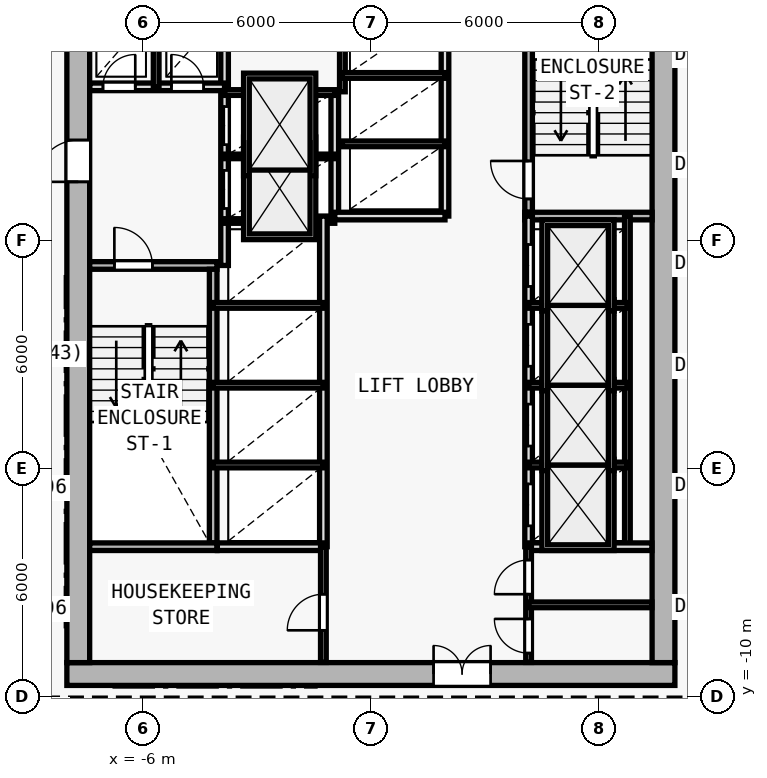
"""IFC4 building model, lengths in metres.
Left out: names, types, materials, properties, quantities, classifications, styles, units other than length and angle.
Written with IfcOpenShell. Run it as: python <this file> out.ifc"""

import sys

from ifc_helpers import new_model, si_unit, direction, frame, frame_2d, origin, origin_2d, place, context, subcontext, project, spatial, rectangle, i_section, extrude, element, fill, save


model = new_model("IFC4")
c1 = context("Model", 3, precision=1e-05, world=origin(), true_north=direction((0.0, 1.0)))
c2 = subcontext(c1, "Body", "Model", "MODEL_VIEW")
j1 = project(units=[si_unit("LENGTHUNIT", "METRE"), si_unit("PLANEANGLEUNIT", "RADIAN")], contexts=[c1])
p1 = place(None, origin())
s1 = spatial("IfcSite", under=j1, at=p1, CompositionType="ELEMENT")
p2 = place(p1, origin())
s2 = spatial("IfcBuilding", under=s1, at=p2, CompositionType="ELEMENT")
p3 = place(p2, frame((0.0, 0.0, 51.6)))
s3 = spatial("IfcBuildingStorey", under=s2, at=p3, CompositionType="ELEMENT", Elevation=51.6)
for number, where, z_axis, x_axis in (
    (1, (-7.7, -9.4, 0.0), (0.0, 0.0, 1.0), (1.0, 0.0, 0.0)),
    (2, (7.7, -9.4, 0.0), (0.0, 0.0, 1.0), (1.0, 0.0, 0.0)),
    (3, (0.0, -9.4, 0.0), (0.0, 0.0, 1.0), (1.0, 0.0, 0.0)),
    (4, (7.7, 0.4, 0.0), (0.0, 0.0, 1.0), (1.0, 0.0, 0.0)),
    (5, (-7.7, 2.0, 0.0), (0.0, 0.0, 1.0), (1.0, 0.0, 0.0)),
):
    element("IfcColumn", number, at=place(p3, frame(where, z_axis=z_axis, x_axis=x_axis)), inside=s3, PredefinedType="COLUMN", context=c2, shape_type="SweptSolid", body=[
        extrude(i_section(OverallWidth=0.416, OverallDepth=0.446, WebThickness=0.025, FlangeThickness=0.04, FilletRadius=0.015, at=origin_2d()), origin(), (0.0, 0.0, 1.0), 3.6),
    ])
p4 = place(p3, frame((-8.0, -9.4, 0.0), z_axis=(0.0, 0.0, 1.0), x_axis=(1.0, 0.0, 0.0)))
e6 = element("IfcWall", 6, at=p4, inside=s3, PredefinedType="SHEAR", context=c2, shape_type="SweptSolid", body=[
    extrude(rectangle(XDim=16.0, YDim=0.6, at=frame_2d((8.0, 0.0))), origin(), (0.0, 0.0, 1.0), 3.35),
])
p5 = place(p4, frame((9.65, 0.0, 0.0)))
e7 = element("IfcOpeningElement", 7, at=p5, cuts=e6, PredefinedType="OPENING", context=c2, shape_type="SweptSolid", body=[
    extrude(rectangle(XDim=1.5, YDim=2.2, at=frame_2d((0.75, 1.1))), frame((0.0, 0.31, 0.0), z_axis=(0.0, -1.0, 0.0), x_axis=(1.0, 0.0, 0.0)), (0.0, 0.0, 1.0), 0.62),
])
p6 = place(p3, frame((-7.7, -9.1, 0.0), z_axis=(0.0, 0.0, 1.0), x_axis=(0.0, 1.0, 0.0)))
e8 = element("IfcWall", 8, at=p6, inside=s3, PredefinedType="SHEAR", context=c2, shape_type="SweptSolid", body=[
    extrude(rectangle(XDim=19.0, YDim=0.6, at=frame_2d((9.5, 0.0))), origin(), (0.0, 0.0, 1.0), 3.35),
])
p7 = place(p6, frame((12.65, 0.0, 0.0)))
e9 = element("IfcOpeningElement", 9, at=p7, cuts=e8, PredefinedType="OPENING", context=c2, shape_type="SweptSolid", body=[
    extrude(rectangle(XDim=1.1, YDim=2.15, at=frame_2d((0.55, 1.075))), frame((0.0, 0.31, 0.0), z_axis=(0.0, -1.0, 0.0), x_axis=(1.0, 0.0, 0.0)), (0.0, 0.0, 1.0), 0.62),
])
p8 = place(p3, frame((7.7, 9.9, 0.0), z_axis=(0.0, 0.0, 1.0), x_axis=(0.0, -1.0, 0.0)))
e10 = element("IfcWall", 10, at=p8, inside=s3, PredefinedType="SHEAR", context=c2, shape_type="SweptSolid", body=[
    extrude(rectangle(XDim=19.0, YDim=0.6, at=frame_2d((9.5, 0.0))), origin(), (0.0, 0.0, 1.0), 3.35),
])
p9 = place(p3, frame((-7.4, 1.35, 0.0), z_axis=(0.0, 0.0, 1.0), x_axis=(1.0, 0.0, 0.0)))
e11 = element("IfcWall", 11, at=p9, inside=s3, PredefinedType="SOLIDWALL", context=c2, shape_type="SweptSolid", body=[
    extrude(rectangle(XDim=3.35, YDim=0.2, at=frame_2d((1.675, 0.0))), origin(), (0.0, 0.0, 1.0), 3.35),
])
p10 = place(p9, frame((0.65, 0.0, 0.0)))
e12 = element("IfcOpeningElement", 12, at=p10, cuts=e11, PredefinedType="OPENING", context=c2, shape_type="SweptSolid", body=[
    extrude(rectangle(XDim=1.0, YDim=2.15, at=frame_2d((0.5, 1.075))), frame((0.0, 0.11, 0.0), z_axis=(0.0, -1.0, 0.0), x_axis=(1.0, 0.0, 0.0)), (0.0, 0.0, 1.0), 0.22),
])
p11 = place(p3, frame((-4.15, -5.95, 0.0), z_axis=(0.0, 0.0, 1.0), x_axis=(0.0, 1.0, 0.0)))
e13 = element("IfcWall", 13, at=p11, inside=s3, PredefinedType="SOLIDWALL", context=c2, shape_type="SweptSolid", body=[
    extrude(rectangle(XDim=7.2, YDim=0.2, at=frame_2d((3.6, 0.0))), origin(), (0.0, 0.0, 1.0), 3.35),
])
p12 = place(p3, frame((-3.85, 1.35, 0.0), z_axis=(0.0, 0.0, 1.0), x_axis=(0.0, 1.0, 0.0)))
e14 = element("IfcWall", 14, at=p12, inside=s3, PredefinedType="SOLIDWALL", context=c2, shape_type="SweptSolid", body=[
    extrude(rectangle(XDim=8.545, YDim=0.2, at=frame_2d((4.272, 0.0))), origin(), (0.0, 0.0, 1.0), 3.35),
])
p13 = place(p12, frame((1.5, 0.0, 0.0)))
e15 = element("IfcOpeningElement", 15, at=p13, cuts=e14, PredefinedType="OPENING", context=c2, shape_type="SweptSolid", body=[
    extrude(rectangle(XDim=1.0, YDim=2.15, at=frame_2d((0.5, 1.075))), frame((0.0, 0.11, 0.0), z_axis=(0.0, -1.0, 0.0), x_axis=(1.0, 0.0, 0.0)), (0.0, 0.0, 1.0), 0.22),
])
p14 = place(p12, frame((3.18, 0.0, 0.0)))
e16 = element("IfcOpeningElement", 16, at=p14, cuts=e14, PredefinedType="OPENING", context=c2, shape_type="SweptSolid", body=[
    extrude(rectangle(XDim=1.0, YDim=2.15, at=frame_2d((0.5, 1.075))), frame((0.0, 0.11, 0.0), z_axis=(0.0, -1.0, 0.0), x_axis=(1.0, 0.0, 0.0)), (0.0, 0.0, 1.0), 0.22),
])
p15 = place(p3, frame((-7.395, 6.05, 0.0), z_axis=(0.0, 0.0, 1.0), x_axis=(1.0, 0.0, 0.0)))
e17 = element("IfcWall", 17, at=p15, inside=s3, PredefinedType="SOLIDWALL", context=c2, shape_type="SweptSolid", body=[
    extrude(rectangle(XDim=3.545, YDim=0.2, at=frame_2d((1.772, 0.0))), origin(), (0.0, 0.0, 1.0), 3.35),
])
p16 = place(p15, frame((0.345, 0.0, 0.0)))
e18 = element("IfcOpeningElement", 18, at=p16, cuts=e17, PredefinedType="OPENING", context=c2, shape_type="SweptSolid", body=[
    extrude(rectangle(XDim=0.85, YDim=2.1, at=frame_2d((0.425, 1.05))), frame((0.0, 0.11, 0.0), z_axis=(0.0, -1.0, 0.0), x_axis=(1.0, 0.0, 0.0)), (0.0, 0.0, 1.0), 0.22),
])
p17 = place(p15, frame((2.145, 0.0, 0.0)))
e19 = element("IfcOpeningElement", 19, at=p17, cuts=e17, PredefinedType="OPENING", context=c2, shape_type="SweptSolid", body=[
    extrude(rectangle(XDim=0.85, YDim=2.1, at=frame_2d((0.425, 1.05))), frame((0.0, 0.11, 0.0), z_axis=(0.0, -1.0, 0.0), x_axis=(1.0, 0.0, 0.0)), (0.0, 0.0, 1.0), 0.22),
])
p18 = place(p3, frame((-5.65, 6.05, 0.0), z_axis=(0.0, 0.0, 1.0), x_axis=(0.0, 1.0, 0.0)))
e20 = element("IfcWall", 20, at=p18, inside=s3, PredefinedType="PARTITIONING", context=c2, shape_type="SweptSolid", body=[
    extrude(rectangle(XDim=2.05, YDim=0.15, at=frame_2d((1.025, 0.0))), origin(), (0.0, 0.0, 1.0), 3.35),
])
p19 = place(p3, frame((4.15, 2.75, 0.0), z_axis=(0.0, 0.0, 1.0), x_axis=(0.0, 1.0, 0.0)))
e21 = element("IfcWall", 21, at=p19, inside=s3, PredefinedType="SOLIDWALL", context=c2, shape_type="SweptSolid", body=[
    extrude(rectangle(XDim=7.15, YDim=0.2, at=frame_2d((3.575, 0.0))), origin(), (0.0, 0.0, 1.0), 3.35),
])
p20 = place(p19, frame((0.35, 0.0, 0.0)))
e22 = element("IfcOpeningElement", 22, at=p20, cuts=e21, PredefinedType="OPENING", context=c2, shape_type="SweptSolid", body=[
    extrude(rectangle(XDim=1.0, YDim=2.15, at=frame_2d((0.5, 1.075))), frame((0.0, 0.11, 0.0), z_axis=(0.0, -1.0, 0.0), x_axis=(1.0, 0.0, 0.0)), (0.0, 0.0, 1.0), 0.22),
])
p21 = place(p3, frame((4.05, 2.65, 0.0), z_axis=(0.0, 0.0, 1.0), x_axis=(1.0, 0.0, 0.0)))
e23 = element("IfcWall", 23, at=p21, inside=s3, PredefinedType="SOLIDWALL", context=c2, shape_type="SweptSolid", body=[
    extrude(rectangle(XDim=3.35, YDim=0.2, at=frame_2d((1.675, 0.0))), origin(), (0.0, 0.0, 1.0), 3.35),
])
p22 = place(p3, frame((-0.95, 2.65, 0.0), z_axis=(0.0, 0.0, 1.0), x_axis=(0.0, 1.0, 0.0)))
e24 = element("IfcWall", 24, at=p22, inside=s3, PredefinedType="SOLIDWALL", context=c2, shape_type="SweptSolid", body=[
    extrude(rectangle(XDim=3.27, YDim=0.2, at=frame_2d((1.635, 0.0))), origin(), (0.0, 0.0, 1.0), 3.35),
])
for number, where, z_axis, x_axis in (
    (25, (-3.85, 2.52, 0.0), (0.0, 0.0, 1.0), (1.0, 0.0, 0.0)),
    (26, (-3.85, 4.22, 0.0), (0.0, 0.0, 1.0), (1.0, 0.0, 0.0)),
):
    element("IfcWall", number, at=place(p3, frame(where, z_axis=z_axis, x_axis=x_axis)), inside=s3, PredefinedType="PARTITIONING", context=c2, shape_type="SweptSolid", body=[
        extrude(rectangle(XDim=2.9, YDim=0.12, at=frame_2d((1.45, 0.0))), origin(), (0.0, 0.0, 1.0), 3.35),
    ])
p23 = place(p3, frame((-3.85, 5.9, 0.0), z_axis=(0.0, 0.0, 1.0), x_axis=(1.0, 0.0, 0.0)))
e27 = element("IfcWall", 27, at=p23, inside=s3, PredefinedType="PARTITIONING", context=c2, shape_type="SweptSolid", body=[
    extrude(rectangle(XDim=2.9, YDim=0.15, at=frame_2d((1.45, 0.0))), origin(), (0.0, 0.0, 1.0), 3.35),
])
p24 = place(p3, frame((4.15, -6.05, 0.0), z_axis=(0.0, 0.0, 1.0), x_axis=(0.0, 1.0, 0.0)))
e28 = element("IfcWall", 28, at=p24, inside=s3, PredefinedType="SOLIDWALL", context=c2, shape_type="SweptSolid", body=[
    extrude(rectangle(XDim=8.7, YDim=0.2, at=frame_2d((4.35, 0.0))), origin(), (0.0, 0.0, 1.0), 3.35),
])
p25 = place(p24, frame((0.55, 0.0, 0.0)))
e29 = element("IfcOpeningElement", 29, at=p25, cuts=e28, PredefinedType="OPENING", context=c2, shape_type="SweptSolid", body=[
    extrude(rectangle(XDim=1.1, YDim=2.15, at=frame_2d((0.55, 1.075))), frame((0.0, 0.11, 0.0), z_axis=(0.0, -1.0, 0.0), x_axis=(1.0, 0.0, 0.0)), (0.0, 0.0, 1.0), 0.22),
])
p26 = place(p24, frame((2.65, 0.0, 0.0)))
e30 = element("IfcOpeningElement", 30, at=p26, cuts=e28, PredefinedType="OPENING", context=c2, shape_type="SweptSolid", body=[
    extrude(rectangle(XDim=1.1, YDim=2.15, at=frame_2d((0.55, 1.075))), frame((0.0, 0.11, 0.0), z_axis=(0.0, -1.0, 0.0), x_axis=(1.0, 0.0, 0.0)), (0.0, 0.0, 1.0), 0.22),
])
p27 = place(p24, frame((4.75, 0.0, 0.0)))
e31 = element("IfcOpeningElement", 31, at=p27, cuts=e28, PredefinedType="OPENING", context=c2, shape_type="SweptSolid", body=[
    extrude(rectangle(XDim=1.1, YDim=2.15, at=frame_2d((0.55, 1.075))), frame((0.0, 0.11, 0.0), z_axis=(0.0, -1.0, 0.0), x_axis=(1.0, 0.0, 0.0)), (0.0, 0.0, 1.0), 0.22),
])
p28 = place(p24, frame((6.85, 0.0, 0.0)))
e32 = element("IfcOpeningElement", 32, at=p28, cuts=e28, PredefinedType="OPENING", context=c2, shape_type="SweptSolid", body=[
    extrude(rectangle(XDim=1.1, YDim=2.15, at=frame_2d((0.55, 1.075))), frame((0.0, 0.11, 0.0), z_axis=(0.0, -1.0, 0.0), x_axis=(1.0, 0.0, 0.0)), (0.0, 0.0, 1.0), 0.22),
])
p29 = place(p3, frame((6.75, -6.05, 0.0), z_axis=(0.0, 0.0, 1.0), x_axis=(0.0, 1.0, 0.0)))
e33 = element("IfcWall", 33, at=p29, inside=s3, PredefinedType="PARTITIONING", context=c2, shape_type="SweptSolid", body=[
    extrude(rectangle(XDim=8.7, YDim=0.15, at=frame_2d((4.35, 0.0))), origin(), (0.0, 0.0, 1.0), 3.35),
])
for number, where, z_axis, x_axis in (
    (34, (4.15, -3.9, 0.0), (0.0, 0.0, 1.0), (1.0, 0.0, 0.0)),
    (35, (4.15, -1.8, 0.0), (0.0, 0.0, 1.0), (1.0, 0.0, 0.0)),
    (36, (4.15, 0.3, 0.0), (0.0, 0.0, 1.0), (1.0, 0.0, 0.0)),
):
    element("IfcWall", number, at=place(p3, frame(where, z_axis=z_axis, x_axis=x_axis)), inside=s3, PredefinedType="PARTITIONING", context=c2, shape_type="SweptSolid", body=[
        extrude(rectangle(XDim=2.6, YDim=0.15, at=frame_2d((1.3, 0.0))), origin(), (0.0, 0.0, 1.0), 3.35),
    ])
p30 = place(p3, frame((-1.25, -6.05, 0.0), z_axis=(0.0, 0.0, 1.0), x_axis=(0.0, 1.0, 0.0)))
e37 = element("IfcWall", 37, at=p30, inside=s3, PredefinedType="SOLIDWALL", context=c2, shape_type="SweptSolid", body=[
    extrude(rectangle(XDim=8.7, YDim=0.2, at=frame_2d((4.35, 0.0))), origin(), (0.0, 0.0, 1.0), 3.35),
])
for number, where, z_axis, x_axis in (
    (38, (-4.15, -3.9, 0.0), (0.0, 0.0, 1.0), (1.0, 0.0, 0.0)),
    (39, (-4.15, -1.8, 0.0), (0.0, 0.0, 1.0), (1.0, 0.0, 0.0)),
    (40, (-4.15, 0.3, 0.0), (0.0, 0.0, 1.0), (1.0, 0.0, 0.0)),
):
    element("IfcWall", number, at=place(p3, frame(where, z_axis=z_axis, x_axis=x_axis)), inside=s3, PredefinedType="PARTITIONING", context=c2, shape_type="SweptSolid", body=[
        extrude(rectangle(XDim=2.9, YDim=0.15, at=frame_2d((1.45, 0.0))), origin(), (0.0, 0.0, 1.0), 3.35),
    ])
p31 = place(p3, frame((1.95, 2.65, 0.0), z_axis=(0.0, 0.0, 1.0), x_axis=(0.0, 1.0, 0.0)))
e41 = element("IfcWall", 41, at=p31, inside=s3, PredefinedType="SOLIDWALL", context=c2, shape_type="SweptSolid", body=[
    extrude(rectangle(XDim=7.245, YDim=0.2, at=frame_2d((3.623, 0.0))), origin(), (0.0, 0.0, 1.0), 3.35),
])
p32 = place(p3, frame((-0.95, 2.65, 0.0), z_axis=(0.0, 0.0, 1.0), x_axis=(1.0, 0.0, 0.0)))
e42 = element("IfcWall", 42, at=p32, inside=s3, PredefinedType="SOLIDWALL", context=c2, shape_type="SweptSolid", body=[
    extrude(rectangle(XDim=2.9, YDim=0.2, at=frame_2d((1.45, 0.0))), origin(), (0.0, 0.0, 1.0), 3.35),
])
p33 = place(p3, frame((-0.75, 5.92, 0.0), z_axis=(0.0, 0.0, 1.0), x_axis=(0.0, 1.0, 0.0)))
e43 = element("IfcWall", 43, at=p33, inside=s3, PredefinedType="PARTITIONING", context=c2, shape_type="SweptSolid", body=[
    extrude(rectangle(XDim=3.975, YDim=0.15, at=frame_2d((1.988, 0.0))), origin(), (0.0, 0.0, 1.0), 3.35),
])
for number, where, z_axis, x_axis in (
    (44, (-0.75, 4.55, 0.0), (0.0, 0.0, 1.0), (1.0, 0.0, 0.0)),
    (45, (-0.75, 6.35, 0.0), (0.0, 0.0, 1.0), (1.0, 0.0, 0.0)),
):
    element("IfcWall", number, at=place(p3, frame(where, z_axis=z_axis, x_axis=x_axis)), inside=s3, PredefinedType="PARTITIONING", context=c2, shape_type="SweptSolid", body=[
        extrude(rectangle(XDim=2.7, YDim=0.15, at=frame_2d((1.35, 0.0))), origin(), (0.0, 0.0, 1.0), 3.35),
    ])
p34 = place(p3, frame((-7.4, -6.05, 0.0), z_axis=(0.0, 0.0, 1.0), x_axis=(1.0, 0.0, 0.0)))
e46 = element("IfcWall", 46, at=p34, inside=s3, PredefinedType="SOLIDWALL", context=c2, shape_type="SweptSolid", body=[
    extrude(rectangle(XDim=3.35, YDim=0.2, at=frame_2d((1.675, 0.0))), origin(), (0.0, 0.0, 1.0), 3.35),
])
p35 = place(p3, frame((-4.04, -6.05, 0.0), z_axis=(0.0, 0.0, 1.0), x_axis=(1.0, 0.0, 0.0)))
e47 = element("IfcWall", 47, at=p35, inside=s3, PredefinedType="SOLIDWALL", context=c2, shape_type="SweptSolid", body=[
    extrude(rectangle(XDim=2.79, YDim=0.2, at=frame_2d((1.395, 0.0))), origin(), (0.0, 0.0, 1.0), 3.35),
])
p36 = place(p3, frame((4.15, -6.05, 0.0), z_axis=(0.0, 0.0, 1.0), x_axis=(1.0, 0.0, 0.0)))
e48 = element("IfcWall", 48, at=p36, inside=s3, PredefinedType="SOLIDWALL", context=c2, shape_type="SweptSolid", body=[
    extrude(rectangle(XDim=3.245, YDim=0.2, at=frame_2d((1.623, 0.0))), origin(), (0.0, 0.0, 1.0), 3.35),
])
p37 = place(p3, frame((-1.25, -9.095, 0.0), z_axis=(0.0, 0.0, 1.0), x_axis=(0.0, 1.0, 0.0)))
e49 = element("IfcWall", 49, at=p37, inside=s3, PredefinedType="PARTITIONING", context=c2, shape_type="SweptSolid", body=[
    extrude(rectangle(XDim=3.045, YDim=0.15, at=frame_2d((1.522, 0.0))), origin(), (0.0, 0.0, 1.0), 3.35),
])
p38 = place(p37, frame((0.845, 0.0, 0.0)))
e50 = element("IfcOpeningElement", 50, at=p38, cuts=e49, PredefinedType="OPENING", context=c2, shape_type="SweptSolid", body=[
    extrude(rectangle(XDim=0.95, YDim=2.1, at=frame_2d((0.475, 1.05))), frame((0.0, 0.085, 0.0), z_axis=(0.0, -1.0, 0.0), x_axis=(1.0, 0.0, 0.0)), (0.0, 0.0, 1.0), 0.17),
])
p39 = place(p3, frame((4.15, -9.095, 0.0), z_axis=(0.0, 0.0, 1.0), x_axis=(0.0, 1.0, 0.0)))
e51 = element("IfcWall", 51, at=p39, inside=s3, PredefinedType="PARTITIONING", context=c2, shape_type="SweptSolid", body=[
    extrude(rectangle(XDim=3.045, YDim=0.15, at=frame_2d((1.522, 0.0))), origin(), (0.0, 0.0, 1.0), 3.35),
])
p40 = place(p39, frame((0.245, 0.0, 0.0)))
e52 = element("IfcOpeningElement", 52, at=p40, cuts=e51, PredefinedType="OPENING", context=c2, shape_type="SweptSolid", body=[
    extrude(rectangle(XDim=0.9, YDim=2.1, at=frame_2d((0.45, 1.05))), frame((0.0, 0.085, 0.0), z_axis=(0.0, -1.0, 0.0), x_axis=(1.0, 0.0, 0.0)), (0.0, 0.0, 1.0), 0.17),
])
p41 = place(p39, frame((1.795, 0.0, 0.0)))
e53 = element("IfcOpeningElement", 53, at=p41, cuts=e51, PredefinedType="OPENING", context=c2, shape_type="SweptSolid", body=[
    extrude(rectangle(XDim=0.9, YDim=2.1, at=frame_2d((0.45, 1.05))), frame((0.0, 0.085, 0.0), z_axis=(0.0, -1.0, 0.0), x_axis=(1.0, 0.0, 0.0)), (0.0, 0.0, 1.0), 0.17),
])
p42 = place(p3, frame((4.15, -7.58, 0.0), z_axis=(0.0, 0.0, 1.0), x_axis=(1.0, 0.0, 0.0)))
e54 = element("IfcWall", 54, at=p42, inside=s3, PredefinedType="PARTITIONING", context=c2, shape_type="SweptSolid", body=[
    extrude(rectangle(XDim=3.245, YDim=0.15, at=frame_2d((1.623, 0.0))), origin(), (0.0, 0.0, 1.0), 3.35),
])
p43 = place(p5, origin())
e55 = element("IfcDoor", 55, at=p43, inside=s3, OperationType="DOUBLE_DOOR_SINGLE_SWING", PredefinedType="DOOR", context=c2, shape_type="SweptSolid", body=[
    extrude(rectangle(XDim=1.5, YDim=2.2, at=frame_2d((0.75, 1.1))), frame((0.0, 0.025, 0.0), z_axis=(0.0, -1.0, 0.0), x_axis=(1.0, 0.0, 0.0)), (0.0, 0.0, 1.0), 0.05),
])
fill(e7, e55)
p44 = place(p7, origin())
e56 = element("IfcDoor", 56, at=p44, inside=s3, OperationType="SINGLE_SWING_LEFT", PredefinedType="DOOR", context=c2, shape_type="SweptSolid", body=[
    extrude(rectangle(XDim=1.1, YDim=2.15, at=frame_2d((0.55, 1.075))), frame((0.0, 0.025, 0.0), z_axis=(0.0, -1.0, 0.0), x_axis=(1.0, 0.0, 0.0)), (0.0, 0.0, 1.0), 0.05),
])
fill(e9, e56)
p45 = place(p10, origin())
e57 = element("IfcDoor", 57, at=p45, inside=s3, OperationType="SINGLE_SWING_LEFT", PredefinedType="DOOR", context=c2, shape_type="SweptSolid", body=[
    extrude(rectangle(XDim=1.0, YDim=2.15, at=frame_2d((0.5, 1.075))), frame((0.0, 0.025, 0.0), z_axis=(0.0, -1.0, 0.0), x_axis=(1.0, 0.0, 0.0)), (0.0, 0.0, 1.0), 0.05),
])
fill(e12, e57)
p46 = place(p16, origin())
e58 = element("IfcDoor", 58, at=p46, inside=s3, OperationType="SINGLE_SWING_RIGHT", PredefinedType="DOOR", context=c2, shape_type="SweptSolid", body=[
    extrude(rectangle(XDim=0.85, YDim=2.1, at=frame_2d((0.425, 1.05))), frame((0.0, 0.025, 0.0), z_axis=(0.0, -1.0, 0.0), x_axis=(1.0, 0.0, 0.0)), (0.0, 0.0, 1.0), 0.05),
])
fill(e18, e58)
p47 = place(p17, origin())
e59 = element("IfcDoor", 59, at=p47, inside=s3, OperationType="SINGLE_SWING_LEFT", PredefinedType="DOOR", context=c2, shape_type="SweptSolid", body=[
    extrude(rectangle(XDim=0.85, YDim=2.1, at=frame_2d((0.425, 1.05))), frame((0.0, 0.025, 0.0), z_axis=(0.0, -1.0, 0.0), x_axis=(1.0, 0.0, 0.0)), (0.0, 0.0, 1.0), 0.05),
])
fill(e19, e59)
p48 = place(p20, origin())
e60 = element("IfcDoor", 60, at=p48, inside=s3, OperationType="SINGLE_SWING_RIGHT", PredefinedType="DOOR", context=c2, shape_type="SweptSolid", body=[
    extrude(rectangle(XDim=1.0, YDim=2.15, at=frame_2d((0.5, 1.075))), frame((0.0, 0.025, 0.0), z_axis=(0.0, -1.0, 0.0), x_axis=(1.0, 0.0, 0.0)), (0.0, 0.0, 1.0), 0.05),
])
fill(e22, e60)
p49 = place(p25, origin())
e61 = element("IfcDoor", 61, at=p49, inside=s3, OperationType="DOUBLE_DOOR_SLIDING", PredefinedType="DOOR", context=c2, shape_type="SweptSolid", body=[
    extrude(rectangle(XDim=1.1, YDim=2.15, at=frame_2d((0.55, 1.075))), frame((0.0, 0.025, 0.0), z_axis=(0.0, -1.0, 0.0), x_axis=(1.0, 0.0, 0.0)), (0.0, 0.0, 1.0), 0.05),
])
fill(e29, e61)
p50 = place(p26, origin())
e62 = element("IfcDoor", 62, at=p50, inside=s3, OperationType="DOUBLE_DOOR_SLIDING", PredefinedType="DOOR", context=c2, shape_type="SweptSolid", body=[
    extrude(rectangle(XDim=1.1, YDim=2.15, at=frame_2d((0.55, 1.075))), frame((0.0, 0.025, 0.0), z_axis=(0.0, -1.0, 0.0), x_axis=(1.0, 0.0, 0.0)), (0.0, 0.0, 1.0), 0.05),
])
fill(e30, e62)
p51 = place(p27, origin())
e63 = element("IfcDoor", 63, at=p51, inside=s3, OperationType="DOUBLE_DOOR_SLIDING", PredefinedType="DOOR", context=c2, shape_type="SweptSolid", body=[
    extrude(rectangle(XDim=1.1, YDim=2.15, at=frame_2d((0.55, 1.075))), frame((0.0, 0.025, 0.0), z_axis=(0.0, -1.0, 0.0), x_axis=(1.0, 0.0, 0.0)), (0.0, 0.0, 1.0), 0.05),
])
fill(e31, e63)
p52 = place(p28, origin())
e64 = element("IfcDoor", 64, at=p52, inside=s3, OperationType="DOUBLE_DOOR_SLIDING", PredefinedType="DOOR", context=c2, shape_type="SweptSolid", body=[
    extrude(rectangle(XDim=1.1, YDim=2.15, at=frame_2d((0.55, 1.075))), frame((0.0, 0.025, 0.0), z_axis=(0.0, -1.0, 0.0), x_axis=(1.0, 0.0, 0.0)), (0.0, 0.0, 1.0), 0.05),
])
fill(e32, e64)
p53 = place(p13, origin())
e65 = element("IfcDoor", 65, at=p53, inside=s3, OperationType="DOUBLE_DOOR_SLIDING", PredefinedType="DOOR", context=c2, shape_type="SweptSolid", body=[
    extrude(rectangle(XDim=1.0, YDim=2.15, at=frame_2d((0.5, 1.075))), frame((0.0, 0.025, 0.0), z_axis=(0.0, -1.0, 0.0), x_axis=(1.0, 0.0, 0.0)), (0.0, 0.0, 1.0), 0.05),
])
fill(e15, e65)
p54 = place(p14, origin())
e66 = element("IfcDoor", 66, at=p54, inside=s3, OperationType="DOUBLE_DOOR_SLIDING", PredefinedType="DOOR", context=c2, shape_type="SweptSolid", body=[
    extrude(rectangle(XDim=1.0, YDim=2.15, at=frame_2d((0.5, 1.075))), frame((0.0, 0.025, 0.0), z_axis=(0.0, -1.0, 0.0), x_axis=(1.0, 0.0, 0.0)), (0.0, 0.0, 1.0), 0.05),
])
fill(e16, e66)
p55 = place(p38, origin())
e67 = element("IfcDoor", 67, at=p55, inside=s3, OperationType="SINGLE_SWING_LEFT", PredefinedType="DOOR", context=c2, shape_type="SweptSolid", body=[
    extrude(rectangle(XDim=0.95, YDim=2.1, at=frame_2d((0.475, 1.05))), frame((0.0, 0.025, 0.0), z_axis=(0.0, -1.0, 0.0), x_axis=(1.0, 0.0, 0.0)), (0.0, 0.0, 1.0), 0.05),
])
fill(e50, e67)
p56 = place(p40, origin())
e68 = element("IfcDoor", 68, at=p56, inside=s3, OperationType="SINGLE_SWING_RIGHT", PredefinedType="DOOR", context=c2, shape_type="SweptSolid", body=[
    extrude(rectangle(XDim=0.9, YDim=2.1, at=frame_2d((0.45, 1.05))), frame((0.0, 0.025, 0.0), z_axis=(0.0, -1.0, 0.0), x_axis=(1.0, 0.0, 0.0)), (0.0, 0.0, 1.0), 0.05),
])
fill(e52, e68)
p57 = place(p41, origin())
e69 = element("IfcDoor", 69, at=p57, inside=s3, OperationType="SINGLE_SWING_LEFT", PredefinedType="DOOR", context=c2, shape_type="SweptSolid", body=[
    extrude(rectangle(XDim=0.9, YDim=2.1, at=frame_2d((0.45, 1.05))), frame((0.0, 0.025, 0.0), z_axis=(0.0, -1.0, 0.0), x_axis=(1.0, 0.0, 0.0)), (0.0, 0.0, 1.0), 0.05),
])
fill(e53, e69)
save(model, sys.argv[1])
